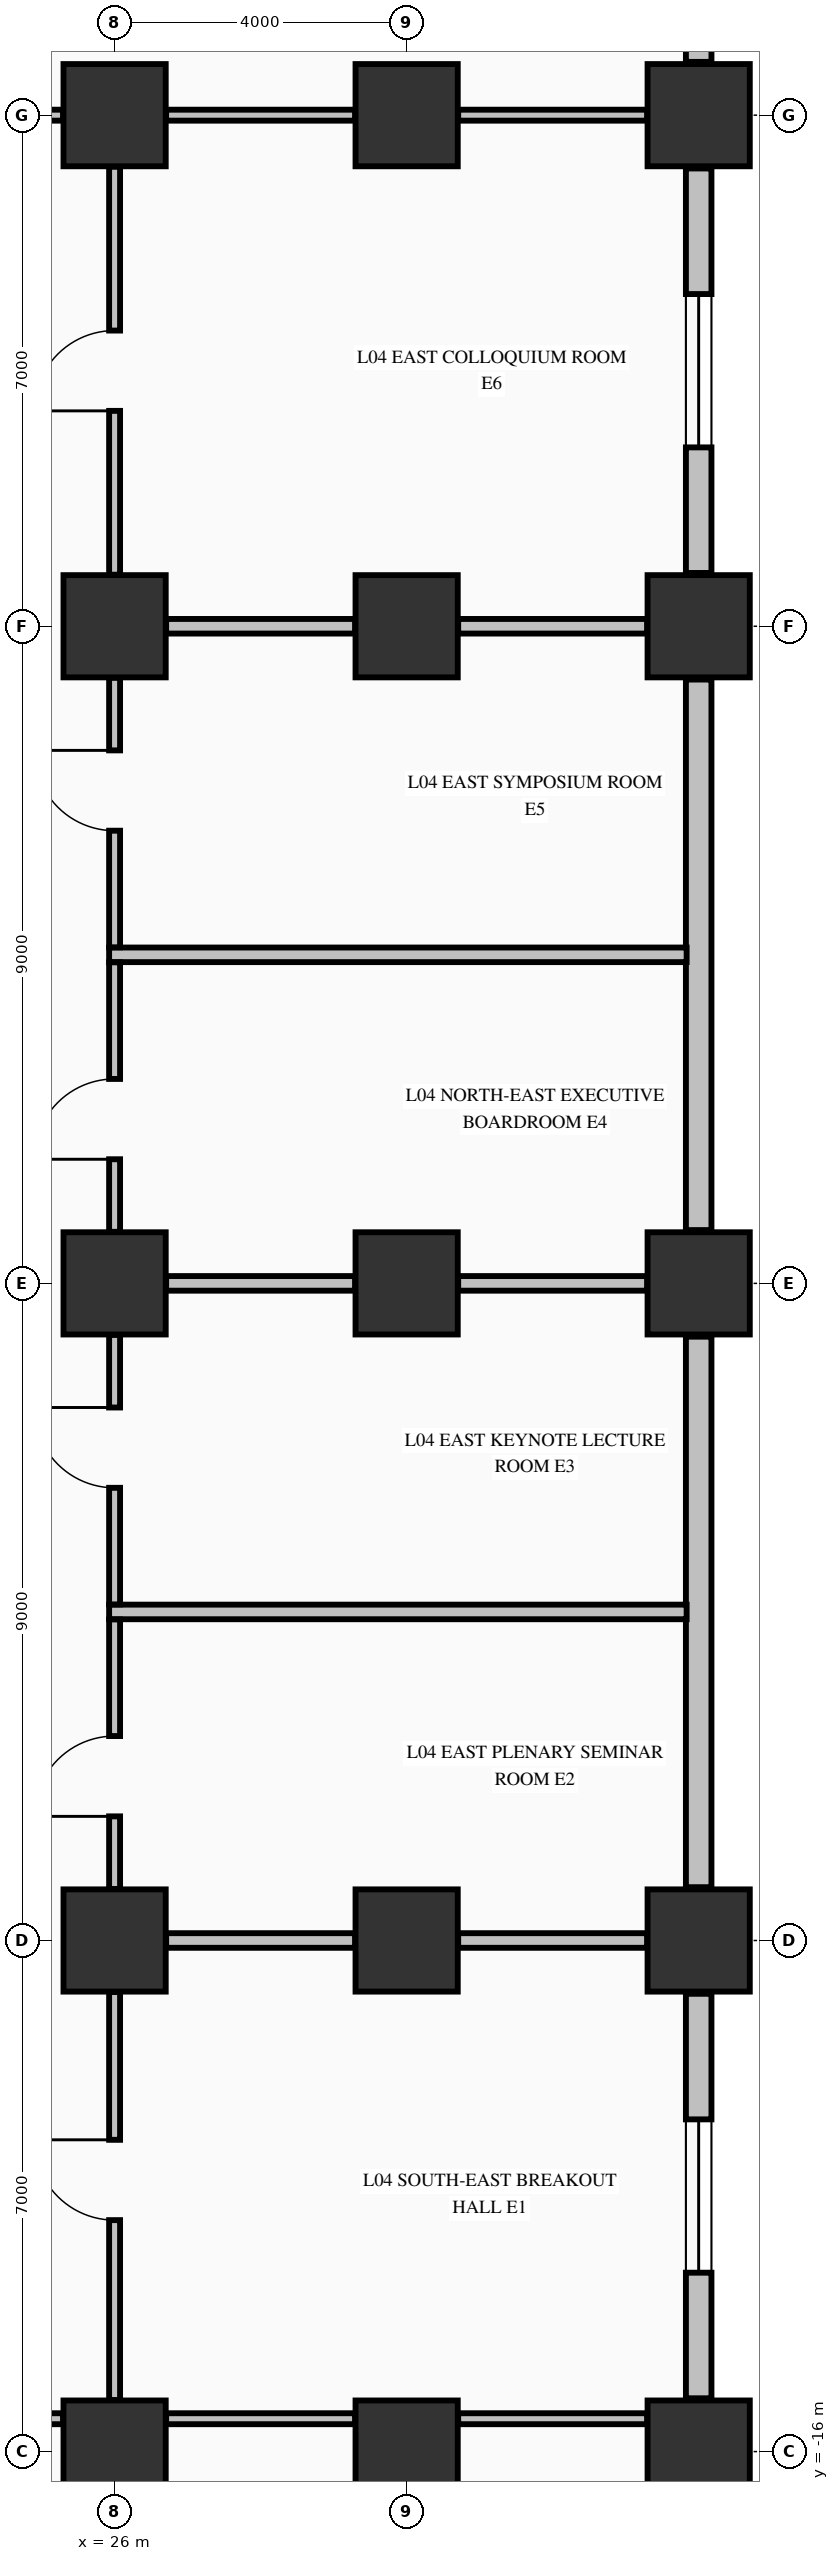
"""IFC4 building model, lengths in metres.
Left out: names, types, materials, properties, quantities, classifications, styles, units other than length and angle.
Written with IfcOpenShell. Run it as: python <this file> out.ifc"""

import sys

from ifc_helpers import new_model, si_unit, direction, frame, frame_2d, origin, origin_2d, place, context, subcontext, project, spatial, rectangle, extrude, element, fill, save


model = new_model("IFC4")
c1 = context("Model", 3, precision=1e-05, world=origin(), true_north=direction((0.0, 1.0)))
c2 = subcontext(c1, "Body", "Model", "MODEL_VIEW")
j1 = project(units=[si_unit("LENGTHUNIT", "METRE"), si_unit("PLANEANGLEUNIT", "RADIAN")], contexts=[c1])
p1 = place(None, origin())
s1 = spatial("IfcSite", under=j1, at=p1, CompositionType="ELEMENT")
p2 = place(p1, origin())
s2 = spatial("IfcBuilding", under=s1, at=p2, CompositionType="ELEMENT")
p3 = place(p2, frame((0.0, 0.0, 21.76)))
s3 = spatial("IfcBuildingStorey", under=s2, at=p3, CompositionType="ELEMENT", Elevation=21.76)
for number, where, z_axis, x_axis in (
    (1, (26.0, -16.0, -0.45), (0.0, 0.0, 1.0), (1.0, 0.0, 0.0)),
    (2, (26.0, -9.0, -0.45), (0.0, 0.0, 1.0), (1.0, 0.0, 0.0)),
    (3, (26.0, 0.0, -0.45), (0.0, 0.0, 1.0), (1.0, 0.0, 0.0)),
    (4, (26.0, 9.0, -0.45), (0.0, 0.0, 1.0), (1.0, 0.0, 0.0)),
    (5, (26.0, 16.0, -0.45), (0.0, 0.0, 1.0), (1.0, 0.0, 0.0)),
    (6, (30.0, -16.0, -0.45), (0.0, 0.0, 1.0), (1.0, 0.0, 0.0)),
    (7, (30.0, -9.0, -0.45), (0.0, 0.0, 1.0), (1.0, 0.0, 0.0)),
    (8, (30.0, 0.0, -0.45), (0.0, 0.0, 1.0), (1.0, 0.0, 0.0)),
    (9, (30.0, 9.0, -0.45), (0.0, 0.0, 1.0), (1.0, 0.0, 0.0)),
    (10, (30.0, 16.0, -0.45), (0.0, 0.0, 1.0), (1.0, 0.0, 0.0)),
    (11, (34.0, -16.0, -0.45), (0.0, 0.0, 1.0), (1.0, 0.0, 0.0)),
    (12, (34.0, -9.0, -0.45), (0.0, 0.0, 1.0), (1.0, 0.0, 0.0)),
    (13, (34.0, 0.0, -0.45), (0.0, 0.0, 1.0), (1.0, 0.0, 0.0)),
    (14, (34.0, 9.0, -0.45), (0.0, 0.0, 1.0), (1.0, 0.0, 0.0)),
    (15, (34.0, 16.0, -0.45), (0.0, 0.0, 1.0), (1.0, 0.0, 0.0)),
):
    element("IfcColumn", number, at=place(p3, frame(where, z_axis=z_axis, x_axis=x_axis)), inside=s3, PredefinedType="COLUMN", context=c2, shape_type="SweptSolid", body=[
        extrude(rectangle(XDim=1.4, YDim=1.4, at=origin_2d()), origin(), (0.0, 0.0, 1.0), 5.44),
    ])
p4 = place(p3, frame((34.0, -9.73, 0.0), z_axis=(0.0, 0.0, 1.0), x_axis=(0.0, -1.0, 0.0)))
e16 = element("IfcWall", 16, at=p4, inside=s3, PredefinedType="STANDARD", context=c2, shape_type="SweptSolid", body=[
    extrude(rectangle(XDim=5.54, YDim=0.35, at=frame_2d((2.77, 0.0))), origin(), (0.0, 0.0, 1.0), 3.332),
])
p5 = place(p4, frame((1.72, 0.0, 0.75)))
e17 = element("IfcOpeningElement", 17, at=p5, cuts=e16, PredefinedType="OPENING", context=c2, shape_type="SweptSolid", body=[
    extrude(rectangle(XDim=2.1, YDim=1.75, at=frame_2d((1.05, 0.875))), frame((0.0, 0.185, 0.0), z_axis=(0.0, -1.0, 0.0), x_axis=(1.0, 0.0, 0.0)), (0.0, 0.0, 1.0), 0.37),
])
for number, where, z_axis, x_axis in (
    (18, (34.0, -0.73, 0.0), (0.0, 0.0, 1.0), (0.0, -1.0, 0.0)),
    (19, (34.0, 8.27, 0.0), (0.0, 0.0, 1.0), (0.0, -1.0, 0.0)),
):
    element("IfcWall", number, at=place(p3, frame(where, z_axis=z_axis, x_axis=x_axis)), inside=s3, PredefinedType="STANDARD", context=c2, shape_type="SweptSolid", body=[
        extrude(rectangle(XDim=7.54, YDim=0.35, at=frame_2d((3.77, 0.0))), origin(), (0.0, 0.0, 1.0), 3.332),
    ])
p6 = place(p3, frame((34.0, 15.27, 0.0), z_axis=(0.0, 0.0, 1.0), x_axis=(0.0, -1.0, 0.0)))
e20 = element("IfcWall", 20, at=p6, inside=s3, PredefinedType="STANDARD", context=c2, shape_type="SweptSolid", body=[
    extrude(rectangle(XDim=5.54, YDim=0.35, at=frame_2d((2.77, 0.0))), origin(), (0.0, 0.0, 1.0), 3.332),
])
p7 = place(p6, frame((1.72, 0.0, 0.75)))
e21 = element("IfcOpeningElement", 21, at=p7, cuts=e20, PredefinedType="OPENING", context=c2, shape_type="SweptSolid", body=[
    extrude(rectangle(XDim=2.1, YDim=1.75, at=frame_2d((1.05, 0.875))), frame((0.0, 0.185, 0.0), z_axis=(0.0, -1.0, 0.0), x_axis=(1.0, 0.0, 0.0)), (0.0, 0.0, 1.0), 0.37),
])
p8 = place(p3, frame((34.0, 21.27, 0.0), z_axis=(0.0, 0.0, 1.0), x_axis=(0.0, -1.0, 0.0)))
e22 = element("IfcWall", 22, at=p8, inside=s3, PredefinedType="STANDARD", context=c2, shape_type="SweptSolid", body=[
    extrude(rectangle(XDim=4.54, YDim=0.35, at=frame_2d((2.27, 0.0))), origin(), (0.0, 0.0, 1.0), 4.99),
])
p9 = place(p3, frame((20.806, -15.55, 0.0), z_axis=(0.0, 0.0, 1.0), x_axis=(1.0, 0.0, 0.0)))
e23 = element("IfcWall", 23, at=p9, inside=s3, PredefinedType="PARTITIONING", context=c2, shape_type="SweptSolid", body=[
    extrude(rectangle(XDim=4.488, YDim=0.15, at=frame_2d((2.244, 0.0))), origin(), (0.0, 0.0, 1.0), 3.332),
])
p10 = place(p9, frame((0.15, 0.0, 0.0)))
e24 = element("IfcOpeningElement", 24, at=p10, cuts=e23, PredefinedType="OPENING", context=c2, shape_type="SweptSolid", body=[
    extrude(rectangle(XDim=1.1, YDim=2.15, at=frame_2d((0.55, 1.075))), frame((0.0, 0.085, 0.0), z_axis=(0.0, -1.0, 0.0), x_axis=(1.0, 0.0, 0.0)), (0.0, 0.0, 1.0), 0.17),
])
p11 = place(p9, frame((2.844, 0.0, 0.0)))
e25 = element("IfcOpeningElement", 25, at=p11, cuts=e23, PredefinedType="OPENING", context=c2, shape_type="SweptSolid", body=[
    extrude(rectangle(XDim=1.1, YDim=2.15, at=frame_2d((0.55, 1.075))), frame((0.0, 0.085, 0.0), z_axis=(0.0, -1.0, 0.0), x_axis=(1.0, 0.0, 0.0)), (0.0, 0.0, 1.0), 0.17),
])
for number, where, z_axis, x_axis in (
    (26, (26.706, -15.55, 0.0), (0.0, 0.0, 1.0), (1.0, 0.0, 0.0)),
    (27, (30.706, -15.55, 0.0), (0.0, 0.0, 1.0), (1.0, 0.0, 0.0)),
):
    element("IfcWall", number, at=place(p3, frame(where, z_axis=z_axis, x_axis=x_axis)), inside=s3, PredefinedType="PARTITIONING", context=c2, shape_type="SweptSolid", body=[
        extrude(rectangle(XDim=2.588, YDim=0.15, at=frame_2d((1.294, 0.0))), origin(), (0.0, 0.0, 1.0), 3.332),
    ])
for number, where, z_axis, x_axis in (
    (28, (26.706, -9.0, 0.0), (0.0, 0.0, 1.0), (1.0, 0.0, 0.0)),
    (29, (30.706, -9.0, 0.0), (0.0, 0.0, 1.0), (1.0, 0.0, 0.0)),
):
    element("IfcWall", number, at=place(p3, frame(where, z_axis=z_axis, x_axis=x_axis)), inside=s3, PredefinedType="PARTITIONING", context=c2, shape_type="SweptSolid", body=[
        extrude(rectangle(XDim=2.588, YDim=0.2, at=frame_2d((1.294, 0.0))), origin(), (0.0, 0.0, 1.0), 3.332),
    ])
p12 = place(p3, frame((25.925, -4.5, 0.0), z_axis=(0.0, 0.0, 1.0), x_axis=(1.0, 0.0, 0.0)))
e30 = element("IfcWall", 30, at=p12, inside=s3, PredefinedType="PARTITIONING", context=c2, shape_type="SweptSolid", body=[
    extrude(rectangle(XDim=7.91, YDim=0.2, at=frame_2d((3.955, 0.0))), origin(), (0.0, 0.0, 1.0), 4.38),
])
for number, where, z_axis, x_axis in (
    (31, (26.706, 0.0, 0.0), (0.0, 0.0, 1.0), (1.0, 0.0, 0.0)),
    (32, (30.706, 0.0, 0.0), (0.0, 0.0, 1.0), (1.0, 0.0, 0.0)),
):
    element("IfcWall", number, at=place(p3, frame(where, z_axis=z_axis, x_axis=x_axis)), inside=s3, PredefinedType="PARTITIONING", context=c2, shape_type="SweptSolid", body=[
        extrude(rectangle(XDim=2.588, YDim=0.2, at=frame_2d((1.294, 0.0))), origin(), (0.0, 0.0, 1.0), 3.332),
    ])
p13 = place(p3, frame((25.925, 4.5, 0.0), z_axis=(0.0, 0.0, 1.0), x_axis=(1.0, 0.0, 0.0)))
e33 = element("IfcWall", 33, at=p13, inside=s3, PredefinedType="PARTITIONING", context=c2, shape_type="SweptSolid", body=[
    extrude(rectangle(XDim=7.91, YDim=0.2, at=frame_2d((3.955, 0.0))), origin(), (0.0, 0.0, 1.0), 4.38),
])
for number, where, z_axis, x_axis in (
    (34, (26.706, 9.0, 0.0), (0.0, 0.0, 1.0), (1.0, 0.0, 0.0)),
    (35, (30.706, 9.0, 0.0), (0.0, 0.0, 1.0), (1.0, 0.0, 0.0)),
):
    element("IfcWall", number, at=place(p3, frame(where, z_axis=z_axis, x_axis=x_axis)), inside=s3, PredefinedType="PARTITIONING", context=c2, shape_type="SweptSolid", body=[
        extrude(rectangle(XDim=2.588, YDim=0.2, at=frame_2d((1.294, 0.0))), origin(), (0.0, 0.0, 1.0), 3.332),
    ])
p14 = place(p3, frame((20.806, 16.0, 0.0), z_axis=(0.0, 0.0, 1.0), x_axis=(1.0, 0.0, 0.0)))
e36 = element("IfcWall", 36, at=p14, inside=s3, PredefinedType="PARTITIONING", context=c2, shape_type="SweptSolid", body=[
    extrude(rectangle(XDim=4.488, YDim=0.15, at=frame_2d((2.244, 0.0))), origin(), (0.0, 0.0, 1.0), 3.332),
])
p15 = place(p14, frame((0.15, 0.0, 0.0)))
e37 = element("IfcOpeningElement", 37, at=p15, cuts=e36, PredefinedType="OPENING", context=c2, shape_type="SweptSolid", body=[
    extrude(rectangle(XDim=1.1, YDim=2.15, at=frame_2d((0.55, 1.075))), frame((0.0, 0.085, 0.0), z_axis=(0.0, -1.0, 0.0), x_axis=(1.0, 0.0, 0.0)), (0.0, 0.0, 1.0), 0.17),
])
p16 = place(p14, frame((2.844, 0.0, 0.0)))
e38 = element("IfcOpeningElement", 38, at=p16, cuts=e36, PredefinedType="OPENING", context=c2, shape_type="SweptSolid", body=[
    extrude(rectangle(XDim=1.1, YDim=2.15, at=frame_2d((0.55, 1.075))), frame((0.0, 0.085, 0.0), z_axis=(0.0, -1.0, 0.0), x_axis=(1.0, 0.0, 0.0)), (0.0, 0.0, 1.0), 0.17),
])
for number, where, z_axis, x_axis in (
    (39, (26.706, 16.0, 0.0), (0.0, 0.0, 1.0), (1.0, 0.0, 0.0)),
    (40, (30.706, 16.0, 0.0), (0.0, 0.0, 1.0), (1.0, 0.0, 0.0)),
):
    element("IfcWall", number, at=place(p3, frame(where, z_axis=z_axis, x_axis=x_axis)), inside=s3, PredefinedType="PARTITIONING", context=c2, shape_type="SweptSolid", body=[
        extrude(rectangle(XDim=2.588, YDim=0.15, at=frame_2d((1.294, 0.0))), origin(), (0.0, 0.0, 1.0), 3.332),
    ])
p17 = place(p3, frame((26.0, -15.294, 0.0), z_axis=(0.0, 0.0, 1.0), x_axis=(0.0, 1.0, 0.0)))
e41 = element("IfcWall", 41, at=p17, inside=s3, PredefinedType="PARTITIONING", context=c2, shape_type="SweptSolid", body=[
    extrude(rectangle(XDim=5.588, YDim=0.15, at=frame_2d((2.794, 0.0))), origin(), (0.0, 0.0, 1.0), 3.332),
])
p18 = place(p17, frame((2.464, 0.0, 0.0)))
e42 = element("IfcOpeningElement", 42, at=p18, cuts=e41, PredefinedType="OPENING", context=c2, shape_type="SweptSolid", body=[
    extrude(rectangle(XDim=1.1, YDim=2.15, at=frame_2d((0.55, 1.075))), frame((0.0, 0.085, 0.0), z_axis=(0.0, -1.0, 0.0), x_axis=(1.0, 0.0, 0.0)), (0.0, 0.0, 1.0), 0.17),
])
p19 = place(p3, frame((26.0, -8.294, 0.0), z_axis=(0.0, 0.0, 1.0), x_axis=(0.0, 1.0, 0.0)))
e43 = element("IfcWall", 43, at=p19, inside=s3, PredefinedType="PARTITIONING", context=c2, shape_type="SweptSolid", body=[
    extrude(rectangle(XDim=3.691, YDim=0.15, at=frame_2d((1.845, 0.0))), origin(), (0.0, 0.0, 1.0), 3.332),
])
p20 = place(p19, frame((0.994, 0.0, 0.0)))
e44 = element("IfcOpeningElement", 44, at=p20, cuts=e43, PredefinedType="OPENING", context=c2, shape_type="SweptSolid", body=[
    extrude(rectangle(XDim=1.1, YDim=2.15, at=frame_2d((0.55, 1.075))), frame((0.0, 0.085, 0.0), z_axis=(0.0, -1.0, 0.0), x_axis=(1.0, 0.0, 0.0)), (0.0, 0.0, 1.0), 0.17),
])
p21 = place(p3, frame((26.0, -4.397, 0.0), z_axis=(0.0, 0.0, 1.0), x_axis=(0.0, 1.0, 0.0)))
e45 = element("IfcWall", 45, at=p21, inside=s3, PredefinedType="PARTITIONING", context=c2, shape_type="SweptSolid", body=[
    extrude(rectangle(XDim=3.691, YDim=0.15, at=frame_2d((1.845, 0.0))), origin(), (0.0, 0.0, 1.0), 3.332),
])
p22 = place(p21, frame((1.597, 0.0, 0.0)))
e46 = element("IfcOpeningElement", 46, at=p22, cuts=e45, PredefinedType="OPENING", context=c2, shape_type="SweptSolid", body=[
    extrude(rectangle(XDim=1.1, YDim=2.15, at=frame_2d((0.55, 1.075))), frame((0.0, 0.085, 0.0), z_axis=(0.0, -1.0, 0.0), x_axis=(1.0, 0.0, 0.0)), (0.0, 0.0, 1.0), 0.17),
])
p23 = place(p3, frame((26.0, 0.706, 0.0), z_axis=(0.0, 0.0, 1.0), x_axis=(0.0, 1.0, 0.0)))
e47 = element("IfcWall", 47, at=p23, inside=s3, PredefinedType="PARTITIONING", context=c2, shape_type="SweptSolid", body=[
    extrude(rectangle(XDim=3.691, YDim=0.15, at=frame_2d((1.845, 0.0))), origin(), (0.0, 0.0, 1.0), 3.332),
])
p24 = place(p23, frame((0.994, 0.0, 0.0)))
e48 = element("IfcOpeningElement", 48, at=p24, cuts=e47, PredefinedType="OPENING", context=c2, shape_type="SweptSolid", body=[
    extrude(rectangle(XDim=1.1, YDim=2.15, at=frame_2d((0.55, 1.075))), frame((0.0, 0.085, 0.0), z_axis=(0.0, -1.0, 0.0), x_axis=(1.0, 0.0, 0.0)), (0.0, 0.0, 1.0), 0.17),
])
p25 = place(p3, frame((26.0, 4.603, 0.0), z_axis=(0.0, 0.0, 1.0), x_axis=(0.0, 1.0, 0.0)))
e49 = element("IfcWall", 49, at=p25, inside=s3, PredefinedType="PARTITIONING", context=c2, shape_type="SweptSolid", body=[
    extrude(rectangle(XDim=3.691, YDim=0.15, at=frame_2d((1.845, 0.0))), origin(), (0.0, 0.0, 1.0), 3.332),
])
p26 = place(p25, frame((1.597, 0.0, 0.0)))
e50 = element("IfcOpeningElement", 50, at=p26, cuts=e49, PredefinedType="OPENING", context=c2, shape_type="SweptSolid", body=[
    extrude(rectangle(XDim=1.1, YDim=2.15, at=frame_2d((0.55, 1.075))), frame((0.0, 0.085, 0.0), z_axis=(0.0, -1.0, 0.0), x_axis=(1.0, 0.0, 0.0)), (0.0, 0.0, 1.0), 0.17),
])
p27 = place(p3, frame((26.0, 9.706, 0.0), z_axis=(0.0, 0.0, 1.0), x_axis=(0.0, 1.0, 0.0)))
e51 = element("IfcWall", 51, at=p27, inside=s3, PredefinedType="PARTITIONING", context=c2, shape_type="SweptSolid", body=[
    extrude(rectangle(XDim=5.588, YDim=0.15, at=frame_2d((2.794, 0.0))), origin(), (0.0, 0.0, 1.0), 3.332),
])
p28 = place(p27, frame((2.244, 0.0, 0.0)))
e52 = element("IfcOpeningElement", 52, at=p28, cuts=e51, PredefinedType="OPENING", context=c2, shape_type="SweptSolid", body=[
    extrude(rectangle(XDim=1.1, YDim=2.15, at=frame_2d((0.55, 1.075))), frame((0.0, 0.085, 0.0), z_axis=(0.0, -1.0, 0.0), x_axis=(1.0, 0.0, 0.0)), (0.0, 0.0, 1.0), 0.17),
])
p29 = place(p5, origin())
e53 = element("IfcWindow", 53, at=p29, inside=s3, PartitioningType="SINGLE_PANEL", PredefinedType="WINDOW", context=c2, shape_type="SweptSolid", body=[
    extrude(rectangle(XDim=2.1, YDim=1.75, at=frame_2d((1.05, 0.875))), frame((0.0, 0.03, 0.0), z_axis=(0.0, -1.0, 0.0), x_axis=(1.0, 0.0, 0.0)), (0.0, 0.0, 1.0), 0.06),
])
fill(e17, e53)
p30 = place(p7, origin())
e54 = element("IfcWindow", 54, at=p30, inside=s3, PartitioningType="SINGLE_PANEL", PredefinedType="WINDOW", context=c2, shape_type="SweptSolid", body=[
    extrude(rectangle(XDim=2.1, YDim=1.75, at=frame_2d((1.05, 0.875))), frame((0.0, 0.03, 0.0), z_axis=(0.0, -1.0, 0.0), x_axis=(1.0, 0.0, 0.0)), (0.0, 0.0, 1.0), 0.06),
])
fill(e21, e54)
p31 = place(p18, origin())
e55 = element("IfcDoor", 55, at=p31, inside=s3, OperationType="SINGLE_SWING_RIGHT", PredefinedType="DOOR", context=c2, shape_type="SweptSolid", body=[
    extrude(rectangle(XDim=1.1, YDim=2.15, at=frame_2d((0.55, 1.075))), frame((0.0, 0.025, 0.0), z_axis=(0.0, -1.0, 0.0), x_axis=(1.0, 0.0, 0.0)), (0.0, 0.0, 1.0), 0.05),
])
fill(e42, e55)
p32 = place(p20, origin())
e56 = element("IfcDoor", 56, at=p32, inside=s3, OperationType="SINGLE_SWING_LEFT", PredefinedType="DOOR", context=c2, shape_type="SweptSolid", body=[
    extrude(rectangle(XDim=1.1, YDim=2.15, at=frame_2d((0.55, 1.075))), frame((0.0, 0.025, 0.0), z_axis=(0.0, -1.0, 0.0), x_axis=(1.0, 0.0, 0.0)), (0.0, 0.0, 1.0), 0.05),
])
fill(e44, e56)
p33 = place(p22, origin())
e57 = element("IfcDoor", 57, at=p33, inside=s3, OperationType="SINGLE_SWING_RIGHT", PredefinedType="DOOR", context=c2, shape_type="SweptSolid", body=[
    extrude(rectangle(XDim=1.1, YDim=2.15, at=frame_2d((0.55, 1.075))), frame((0.0, 0.025, 0.0), z_axis=(0.0, -1.0, 0.0), x_axis=(1.0, 0.0, 0.0)), (0.0, 0.0, 1.0), 0.05),
])
fill(e46, e57)
p34 = place(p24, origin())
e58 = element("IfcDoor", 58, at=p34, inside=s3, OperationType="SINGLE_SWING_LEFT", PredefinedType="DOOR", context=c2, shape_type="SweptSolid", body=[
    extrude(rectangle(XDim=1.1, YDim=2.15, at=frame_2d((0.55, 1.075))), frame((0.0, 0.025, 0.0), z_axis=(0.0, -1.0, 0.0), x_axis=(1.0, 0.0, 0.0)), (0.0, 0.0, 1.0), 0.05),
])
fill(e48, e58)
p35 = place(p26, origin())
e59 = element("IfcDoor", 59, at=p35, inside=s3, OperationType="SINGLE_SWING_RIGHT", PredefinedType="DOOR", context=c2, shape_type="SweptSolid", body=[
    extrude(rectangle(XDim=1.1, YDim=2.15, at=frame_2d((0.55, 1.075))), frame((0.0, 0.025, 0.0), z_axis=(0.0, -1.0, 0.0), x_axis=(1.0, 0.0, 0.0)), (0.0, 0.0, 1.0), 0.05),
])
fill(e50, e59)
p36 = place(p28, origin())
e60 = element("IfcDoor", 60, at=p36, inside=s3, OperationType="SINGLE_SWING_LEFT", PredefinedType="DOOR", context=c2, shape_type="SweptSolid", body=[
    extrude(rectangle(XDim=1.1, YDim=2.15, at=frame_2d((0.55, 1.075))), frame((0.0, 0.025, 0.0), z_axis=(0.0, -1.0, 0.0), x_axis=(1.0, 0.0, 0.0)), (0.0, 0.0, 1.0), 0.05),
])
fill(e52, e60)
save(model, sys.argv[1])
